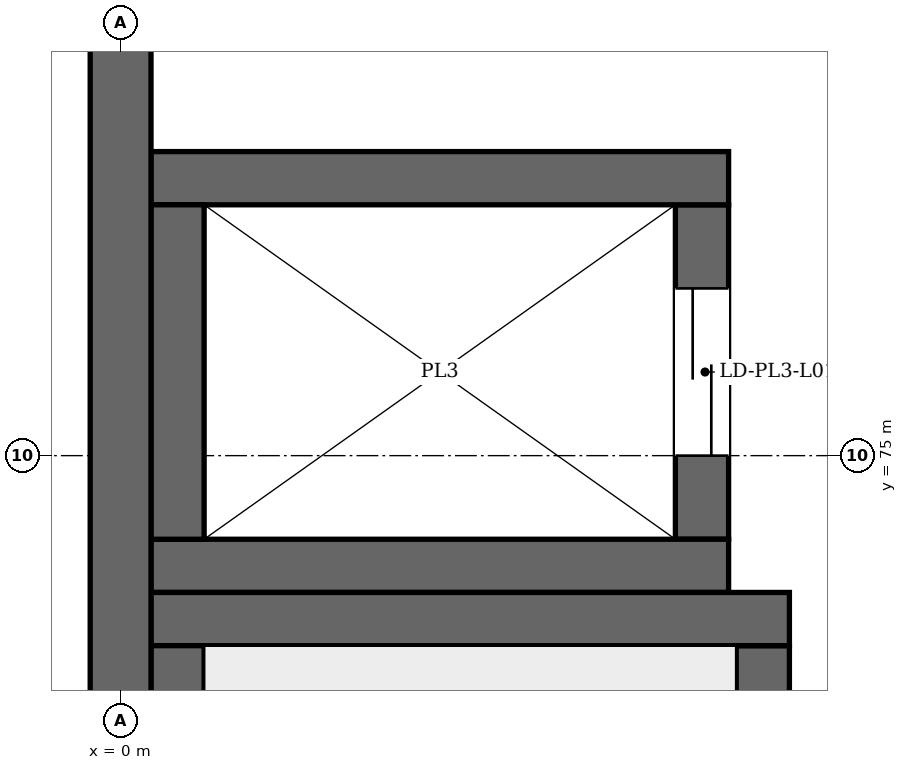
"""IFC4 building model, lengths in metres.
Left out: names, types, materials, properties, quantities, classifications, styles, units other than length and angle.
Written with IfcOpenShell. Run it as: python <this file> out.ifc"""

import sys

from ifc_helpers import new_model, si_unit, direction, frame, frame_2d, origin, place, context, subcontext, project, spatial, rectangle, extrude, element, fill, save


model = new_model("IFC4")
c1 = context("Model", 3, precision=1e-05, world=origin(), true_north=direction((0.0, 1.0)))
c2 = subcontext(c1, "Body", "Model", "MODEL_VIEW")
j1 = project(units=[si_unit("LENGTHUNIT", "METRE"), si_unit("PLANEANGLEUNIT", "RADIAN")], contexts=[c1])
p1 = place(None, origin())
s1 = spatial("IfcSite", under=j1, at=p1, CompositionType="ELEMENT")
p2 = place(p1, origin())
s2 = spatial("IfcBuilding", under=s1, at=p2, CompositionType="ELEMENT")
p3 = place(p2, frame((0.0, 0.0, 6.5)))
s3 = spatial("IfcBuildingStorey", under=s2, at=p3, CompositionType="ELEMENT", Elevation=6.5)
p4 = place(p3, frame((0.0, 46.72, 0.0), z_axis=(0.0, 0.0, 1.0), x_axis=(0.0, 1.0, 0.0)))
e1 = element("IfcWall", 1, at=p4, inside=s3, PredefinedType="SHEAR", context=c2, shape_type="SweptSolid", body=[
    extrude(rectangle(XDim=47.36, YDim=0.4, at=frame_2d((23.68, 0.0))), origin(), (0.0, 0.0, 1.0), 7.7),
])
p5 = place(p3, frame((0.2, 73.925, 0.0), z_axis=(0.0, 0.0, 1.0), x_axis=(1.0, 0.0, 0.0)))
e2 = element("IfcWall", 2, at=p5, inside=s3, PredefinedType="SHEAR", context=c2, shape_type="SweptSolid", body=[
    extrude(rectangle(XDim=4.2, YDim=0.35, at=frame_2d((2.1, 0.0))), origin(), (0.0, 0.0, 1.0), 7.7),
])
for number, where, z_axis, x_axis in (
    (3, (0.375, 67.05, 0.0), (0.0, 0.0, 1.0), (0.0, 1.0, 0.0)),
    (4, (4.225, 67.05, 0.0), (0.0, 0.0, 1.0), (0.0, 1.0, 0.0)),
):
    element("IfcWall", number, at=place(p3, frame(where, z_axis=z_axis, x_axis=x_axis)), inside=s3, PredefinedType="SHEAR", context=c2, shape_type="SweptSolid", body=[
        extrude(rectangle(XDim=6.7, YDim=0.35, at=frame_2d((3.35, 0.0))), origin(), (0.0, 0.0, 1.0), 7.7),
    ])
for number, where, z_axis, x_axis in (
    (5, (0.2, 74.275, 0.0), (0.0, 0.0, 1.0), (1.0, 0.0, 0.0)),
    (6, (0.2, 76.825, 0.0), (0.0, 0.0, 1.0), (1.0, 0.0, 0.0)),
):
    element("IfcWall", number, at=place(p3, frame(where, z_axis=z_axis, x_axis=x_axis)), inside=s3, PredefinedType="SHEAR", context=c2, shape_type="SweptSolid", body=[
        extrude(rectangle(XDim=3.8, YDim=0.35, at=frame_2d((1.9, 0.0))), origin(), (0.0, 0.0, 1.0), 7.7),
    ])
p6 = place(p3, frame((0.375, 74.45, 0.0), z_axis=(0.0, 0.0, 1.0), x_axis=(0.0, 1.0, 0.0)))
e7 = element("IfcWall", 7, at=p6, inside=s3, PredefinedType="SHEAR", context=c2, shape_type="SweptSolid", body=[
    extrude(rectangle(XDim=2.2, YDim=0.35, at=frame_2d((1.1, 0.0))), origin(), (0.0, 0.0, 1.0), 7.7),
])
p7 = place(p3, frame((3.825, 74.45, 0.0), z_axis=(0.0, 0.0, 1.0), x_axis=(0.0, 1.0, 0.0)))
e8 = element("IfcWall", 8, at=p7, inside=s3, PredefinedType="SHEAR", context=c2, shape_type="SweptSolid", body=[
    extrude(rectangle(XDim=2.2, YDim=0.35, at=frame_2d((1.1, 0.0))), origin(), (0.0, 0.0, 1.0), 7.7),
])
p8 = place(p7, frame((0.55, 0.0, 0.0)))
e9 = element("IfcOpeningElement", 9, at=p8, cuts=e8, PredefinedType="OPENING", context=c2, shape_type="SweptSolid", body=[
    extrude(rectangle(XDim=1.1, YDim=2.1, at=frame_2d((0.55, 1.05))), frame((0.0, 0.185, 0.0), z_axis=(0.0, -1.0, 0.0), x_axis=(1.0, 0.0, 0.0)), (0.0, 0.0, 1.0), 0.37),
])
p9 = place(p8, origin())
e10 = element("IfcDoor", 10, at=p9, inside=s3, OperationType="DOUBLE_DOOR_SLIDING", PredefinedType="DOOR", context=c2, shape_type="SweptSolid", body=[
    extrude(rectangle(XDim=1.1, YDim=2.1, at=frame_2d((0.55, 1.05))), frame((0.0, 0.025, 0.0), z_axis=(0.0, -1.0, 0.0), x_axis=(1.0, 0.0, 0.0)), (0.0, 0.0, 1.0), 0.05),
])
fill(e9, e10)
save(model, sys.argv[1])
